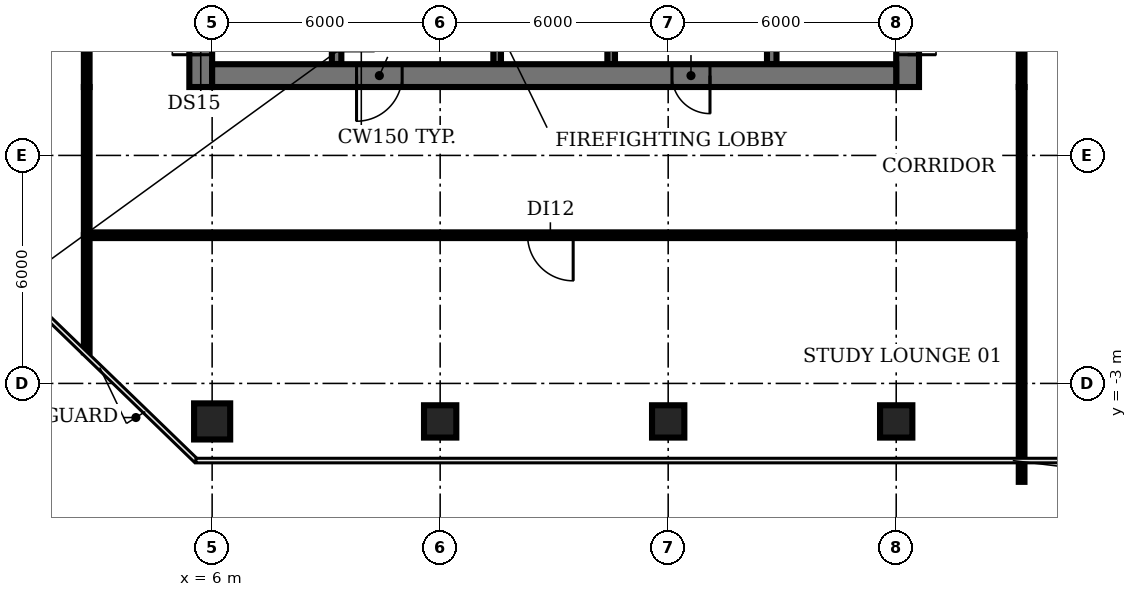
"""IFC4 building model, lengths in metres.
Left out: names, types, materials, properties, quantities, classifications, styles, units other than length and angle.
Written with IfcOpenShell. Run it as: python <this file> out.ifc"""

import sys

from ifc_helpers import new_model, si_unit, direction, frame, frame_2d, origin, origin_2d, place, context, subcontext, project, spatial, rectangle, circle, extrude, element, fill, save


model = new_model("IFC4")
c1 = context("Model", 3, precision=1e-05, world=origin(), true_north=direction((0.0, 1.0)))
c2 = subcontext(c1, "Body", "Model", "MODEL_VIEW")
j1 = project(units=[si_unit("LENGTHUNIT", "METRE"), si_unit("PLANEANGLEUNIT", "RADIAN")], contexts=[c1])
p1 = place(None, origin())
s1 = spatial("IfcSite", under=j1, at=p1, CompositionType="ELEMENT")
p2 = place(p1, origin())
s2 = spatial("IfcBuilding", under=s1, at=p2, CompositionType="ELEMENT")
p3 = place(p2, frame((0.0, 0.0, 155.0)))
s3 = spatial("IfcBuildingStorey", under=s2, at=p3, CompositionType="ELEMENT", Elevation=155.0)
p4 = place(p3, frame((6.0, -4.0, 0.0), z_axis=(0.0, 0.0, 1.0), x_axis=(1.0, 0.0, 0.0)))
e1 = element("IfcColumn", 1, at=p4, inside=s3, PredefinedType="COLUMN", context=c2, shape_type="SweptSolid", body=[
    extrude(circle(Radius=0.475, at=origin_2d()), origin(), (0.0, 0.0, 1.0), 3.85),
])
for number, where, z_axis, x_axis in (
    (2, (12.0, -4.0, 0.0), (0.0, 0.0, 1.0), (1.0, 0.0, 0.0)),
    (3, (18.0, -4.0, 0.0), (0.0, 0.0, 1.0), (1.0, 0.0, 0.0)),
    (4, (24.0, -4.0, 0.0), (0.0, 0.0, 1.0), (1.0, 0.0, 0.0)),
):
    element("IfcColumn", number, at=place(p3, frame(where, z_axis=z_axis, x_axis=x_axis)), inside=s3, PredefinedType="COLUMN", context=c2, shape_type="SweptSolid", body=[
        extrude(rectangle(XDim=0.85, YDim=0.85, at=origin_2d()), origin(), (0.0, 0.0, 1.0), 3.85),
    ])
p5 = place(p3, frame((9.275, 11.825, 0.0), z_axis=(0.0, 0.0, 1.0), x_axis=(0.0, -1.0, 0.0)))
e5 = element("IfcWall", 5, at=p5, inside=s3, PredefinedType="SHEAR", context=c2, shape_type="SweptSolid", body=[
    extrude(rectangle(XDim=6.425, YDim=0.25, at=frame_2d((3.212, 0.0))), origin(), (0.0, 0.0, 1.0), 3.85),
])
p6 = place(p5, frame((5.075, 0.0, 0.0)))
e6 = element("IfcOpeningElement", 6, at=p6, cuts=e5, PredefinedType="OPENING", context=c2, shape_type="SweptSolid", body=[
    extrude(rectangle(XDim=1.0, YDim=2.1, at=frame_2d((0.5, 1.05))), frame((0.0, 0.135, 0.0), z_axis=(0.0, -1.0, 0.0), x_axis=(1.0, 0.0, 0.0)), (0.0, 0.0, 1.0), 0.27),
])
p7 = place(p3, frame((13.5, 5.4, 0.0), z_axis=(0.0, 0.0, 1.0), x_axis=(0.0, 1.0, 0.0)))
e7 = element("IfcWall", 7, at=p7, inside=s3, PredefinedType="SHEAR", context=c2, shape_type="SweptSolid", body=[
    extrude(rectangle(XDim=8.2, YDim=0.2, at=frame_2d((4.1, 0.0))), origin(), (0.0, 0.0, 1.0), 3.85),
])
p8 = place(p7, frame((0.75, 0.0, 0.0)))
e8 = element("IfcOpeningElement", 8, at=p8, cuts=e7, PredefinedType="OPENING", context=c2, shape_type="SweptSolid", body=[
    extrude(rectangle(XDim=1.1, YDim=2.1, at=frame_2d((0.55, 1.05))), frame((0.0, 0.11, 0.0), z_axis=(0.0, -1.0, 0.0), x_axis=(1.0, 0.0, 0.0)), (0.0, 0.0, 1.0), 0.22),
])
p9 = place(p7, frame((3.55, 0.0, 0.0)))
e9 = element("IfcOpeningElement", 9, at=p9, cuts=e7, PredefinedType="OPENING", context=c2, shape_type="SweptSolid", body=[
    extrude(rectangle(XDim=1.1, YDim=2.1, at=frame_2d((0.55, 1.05))), frame((0.0, 0.11, 0.0), z_axis=(0.0, -1.0, 0.0), x_axis=(1.0, 0.0, 0.0)), (0.0, 0.0, 1.0), 0.22),
])
p10 = place(p7, frame((6.35, 0.0, 0.0)))
e10 = element("IfcOpeningElement", 10, at=p10, cuts=e7, PredefinedType="OPENING", context=c2, shape_type="SweptSolid", body=[
    extrude(rectangle(XDim=1.1, YDim=2.1, at=frame_2d((0.55, 1.05))), frame((0.0, 0.11, 0.0), z_axis=(0.0, -1.0, 0.0), x_axis=(1.0, 0.0, 0.0)), (0.0, 0.0, 1.0), 0.22),
])
p11 = place(p3, frame((16.5, 5.4, 0.0), z_axis=(0.0, 0.0, 1.0), x_axis=(0.0, 1.0, 0.0)))
e11 = element("IfcWall", 11, at=p11, inside=s3, PredefinedType="SHEAR", context=c2, shape_type="SweptSolid", body=[
    extrude(rectangle(XDim=8.2, YDim=0.2, at=frame_2d((4.1, 0.0))), origin(), (0.0, 0.0, 1.0), 3.85),
])
p12 = place(p3, frame((20.725, 5.4, 0.0), z_axis=(0.0, 0.0, 1.0), x_axis=(0.0, 1.0, 0.0)))
e12 = element("IfcWall", 12, at=p12, inside=s3, PredefinedType="SHEAR", context=c2, shape_type="SweptSolid", body=[
    extrude(rectangle(XDim=6.3, YDim=0.25, at=frame_2d((3.15, 0.0))), origin(), (0.0, 0.0, 1.0), 3.85),
])
p13 = place(p3, frame((5.7, 4.8, 0.0), z_axis=(0.0, 0.0, 1.0), x_axis=(0.0, 1.0, 0.0)))
e13 = element("IfcWall", 13, at=p13, inside=s3, PredefinedType="SHEAR", context=c2, shape_type="SweptSolid", body=[
    extrude(rectangle(XDim=20.6, YDim=0.6, at=frame_2d((10.3, 0.0))), origin(), (0.0, 0.0, 1.0), 3.85),
])
p14 = place(p13, frame((0.85, 0.0, 0.0)))
e14 = element("IfcOpeningElement", 14, at=p14, cuts=e13, PredefinedType="OPENING", context=c2, shape_type="SweptSolid", body=[
    extrude(rectangle(XDim=1.5, YDim=2.1, at=frame_2d((0.75, 1.05))), frame((0.0, 0.31, 0.0), z_axis=(0.0, -1.0, 0.0), x_axis=(1.0, 0.0, 0.0)), (0.0, 0.0, 1.0), 0.62),
])
p15 = place(p13, frame((7.3, 0.0, 0.0)))
e15 = element("IfcOpeningElement", 15, at=p15, cuts=e13, PredefinedType="OPENING", context=c2, shape_type="SweptSolid", body=[
    extrude(rectangle(XDim=1.2, YDim=2.1, at=frame_2d((0.6, 1.05))), frame((0.0, 0.31, 0.0), z_axis=(0.0, -1.0, 0.0), x_axis=(1.0, 0.0, 0.0)), (0.0, 0.0, 1.0), 0.62),
])
p16 = place(p13, frame((13.85, 0.0, 0.0)))
e16 = element("IfcOpeningElement", 16, at=p16, cuts=e13, PredefinedType="OPENING", context=c2, shape_type="SweptSolid", body=[
    extrude(rectangle(XDim=1.2, YDim=2.1, at=frame_2d((0.6, 1.05))), frame((0.0, 0.31, 0.0), z_axis=(0.0, -1.0, 0.0), x_axis=(1.0, 0.0, 0.0)), (0.0, 0.0, 1.0), 0.62),
])
p17 = place(p3, frame((24.3, 25.555, 0.0), z_axis=(0.0, 0.0, 1.0), x_axis=(0.0, -1.0, 0.0)))
e17 = element("IfcWall", 17, at=p17, inside=s3, PredefinedType="SHEAR", context=c2, shape_type="SweptSolid", body=[
    extrude(rectangle(XDim=20.755, YDim=0.6, at=frame_2d((10.377, 0.0))), origin(), (0.0, 0.0, 1.0), 3.85),
])
p18 = place(p17, frame((18.405, 0.0, 0.0)))
e18 = element("IfcOpeningElement", 18, at=p18, cuts=e17, PredefinedType="OPENING", context=c2, shape_type="SweptSolid", body=[
    extrude(rectangle(XDim=1.5, YDim=2.1, at=frame_2d((0.75, 1.05))), frame((0.0, 0.31, 0.0), z_axis=(0.0, -1.0, 0.0), x_axis=(1.0, 0.0, 0.0)), (0.0, 0.0, 1.0), 0.62),
])
p19 = place(p17, frame((12.305, 0.0, 0.0)))
e19 = element("IfcOpeningElement", 19, at=p19, cuts=e17, PredefinedType="OPENING", context=c2, shape_type="SweptSolid", body=[
    extrude(rectangle(XDim=0.9, YDim=2.1, at=frame_2d((0.45, 1.05))), frame((0.0, 0.31, 0.0), z_axis=(0.0, -1.0, 0.0), x_axis=(1.0, 0.0, 0.0)), (0.0, 0.0, 1.0), 0.62),
])
p20 = place(p17, frame((6.305, 0.0, 0.0)))
e20 = element("IfcOpeningElement", 20, at=p20, cuts=e17, PredefinedType="OPENING", context=c2, shape_type="SweptSolid", body=[
    extrude(rectangle(XDim=2.0, YDim=2.1, at=frame_2d((1.0, 1.05))), frame((0.0, 0.31, 0.0), z_axis=(0.0, -1.0, 0.0), x_axis=(1.0, 0.0, 0.0)), (0.0, 0.0, 1.0), 0.62),
])
p21 = place(p3, frame((24.0, 5.1, 0.0), z_axis=(0.0, 0.0, 1.0), x_axis=(-1.0, 0.0, 0.0)))
e21 = element("IfcWall", 21, at=p21, inside=s3, PredefinedType="SHEAR", context=c2, shape_type="SweptSolid", body=[
    extrude(rectangle(XDim=18.0, YDim=0.6, at=frame_2d((9.0, 0.0))), origin(), (0.0, 0.0, 1.0), 3.85),
])
p22 = place(p21, frame((13.0, 0.0, 0.0)))
e22 = element("IfcOpeningElement", 22, at=p22, cuts=e21, PredefinedType="OPENING", context=c2, shape_type="SweptSolid", body=[
    extrude(rectangle(XDim=1.2, YDim=2.1, at=frame_2d((0.6, 1.05))), frame((0.0, 0.31, 0.0), z_axis=(0.0, -1.0, 0.0), x_axis=(1.0, 0.0, 0.0)), (0.0, 0.0, 1.0), 0.62),
])
p23 = place(p21, frame((4.9, 0.0, 0.0)))
e23 = element("IfcOpeningElement", 23, at=p23, cuts=e21, PredefinedType="OPENING", context=c2, shape_type="SweptSolid", body=[
    extrude(rectangle(XDim=1.0, YDim=2.1, at=frame_2d((0.5, 1.05))), frame((0.0, 0.31, 0.0), z_axis=(0.0, -1.0, 0.0), x_axis=(1.0, 0.0, 0.0)), (0.0, 0.0, 1.0), 0.62),
])
p24 = place(p3, frame((2.7, -2.18, 0.0), z_axis=(0.0, 0.0, 1.0), x_axis=(0.0, 1.0, 0.0)))
e24 = element("IfcWall", 24, at=p24, inside=s3, PredefinedType="PARTITIONING", context=c2, shape_type="SweptSolid", body=[
    extrude(rectangle(XDim=3.08, YDim=0.15, at=frame_2d((1.54, 0.0))), origin(), (0.0, 0.0, 1.0), 2.88),
])
p25 = place(p3, frame((2.7, 0.9, 0.0), z_axis=(0.0, 0.0, 1.0), x_axis=(0.0, 1.0, 0.0)))
e25 = element("IfcWall", 25, at=p25, inside=s3, PredefinedType="PARTITIONING", context=c2, shape_type="SweptSolid", body=[
    extrude(rectangle(XDim=3.9, YDim=0.15, at=frame_2d((1.95, 0.0))), origin(), (0.0, 0.0, 1.0), 2.88),
])
p26 = place(p3, frame((2.7, 4.8, 0.0), z_axis=(0.0, 0.0, 1.0), x_axis=(0.0, 1.0, 0.0)))
e26 = element("IfcWall", 26, at=p26, inside=s3, PredefinedType="PARTITIONING", context=c2, shape_type="SweptSolid", body=[
    extrude(rectangle(XDim=20.6, YDim=0.15, at=frame_2d((10.3, 0.0))), origin(), (0.0, 0.0, 1.0), 2.88),
])
p27 = place(p26, frame((10.2, 0.0, 0.0)))
e27 = element("IfcOpeningElement", 27, at=p27, cuts=e26, PredefinedType="OPENING", context=c2, shape_type="SweptSolid", body=[
    extrude(rectangle(XDim=1.2, YDim=2.1, at=frame_2d((0.6, 1.05))), frame((0.0, 0.085, 0.0), z_axis=(0.0, -1.0, 0.0), x_axis=(1.0, 0.0, 0.0)), (0.0, 0.0, 1.0), 0.17),
])
p28 = place(p3, frame((27.3, -5.59, 0.0), z_axis=(0.0, 0.0, 1.0), x_axis=(0.0, 1.0, 0.0)))
e28 = element("IfcWall", 28, at=p28, inside=s3, PredefinedType="PARTITIONING", context=c2, shape_type="SweptSolid", body=[
    extrude(rectangle(XDim=6.49, YDim=0.15, at=frame_2d((3.245, 0.0))), origin(), (0.0, 0.0, 1.0), 2.88),
])
p29 = place(p3, frame((27.3, 0.9, 0.0), z_axis=(0.0, 0.0, 1.0), x_axis=(-1.0, 0.0, 0.0)))
e29 = element("IfcWall", 29, at=p29, inside=s3, PredefinedType="PARTITIONING", context=c2, shape_type="SweptSolid", body=[
    extrude(rectangle(XDim=24.6, YDim=0.15, at=frame_2d((12.3, 0.0))), origin(), (0.0, 0.0, 1.0), 2.88),
])
p30 = place(p29, frame((11.8, 0.0, 0.0)))
e30 = element("IfcOpeningElement", 30, at=p30, cuts=e29, PredefinedType="OPENING", context=c2, shape_type="SweptSolid", body=[
    extrude(rectangle(XDim=1.2, YDim=2.1, at=frame_2d((0.6, 1.05))), frame((0.0, 0.085, 0.0), z_axis=(0.0, -1.0, 0.0), x_axis=(1.0, 0.0, 0.0)), (0.0, 0.0, 1.0), 0.17),
])
p31 = place(p3, frame((27.3, 0.9, 0.0), z_axis=(0.0, 0.0, 1.0), x_axis=(0.0, 1.0, 0.0)))
e31 = element("IfcWall", 31, at=p31, inside=s3, PredefinedType="PARTITIONING", context=c2, shape_type="SweptSolid", body=[
    extrude(rectangle(XDim=3.9, YDim=0.15, at=frame_2d((1.95, 0.0))), origin(), (0.0, 0.0, 1.0), 2.88),
])
p32 = place(p3, frame((27.3, 4.8, 0.0), z_axis=(0.0, 0.0, 1.0), x_axis=(0.0, 1.0, 0.0)))
e32 = element("IfcWall", 32, at=p32, inside=s3, PredefinedType="PARTITIONING", context=c2, shape_type="SweptSolid", body=[
    extrude(rectangle(XDim=10.0, YDim=0.15, at=frame_2d((5.0, 0.0))), origin(), (0.0, 0.0, 1.0), 2.88),
])
p33 = place(p32, frame((4.4, 0.0, 0.0)))
e33 = element("IfcOpeningElement", 33, at=p33, cuts=e32, PredefinedType="OPENING", context=c2, shape_type="SweptSolid", body=[
    extrude(rectangle(XDim=1.2, YDim=2.1, at=frame_2d((0.6, 1.05))), frame((0.0, 0.085, 0.0), z_axis=(0.0, -1.0, 0.0), x_axis=(1.0, 0.0, 0.0)), (0.0, 0.0, 1.0), 0.17),
])
p34 = place(p14, origin())
e34 = element("IfcDoor", 34, at=p34, inside=s3, OperationType="DOUBLE_DOOR_SINGLE_SWING", PredefinedType="DOOR", context=c2, shape_type="SweptSolid", body=[
    extrude(rectangle(XDim=1.5, YDim=2.1, at=frame_2d((0.75, 1.05))), frame((0.0, 0.025, 0.0), z_axis=(0.0, -1.0, 0.0), x_axis=(1.0, 0.0, 0.0)), (0.0, 0.0, 1.0), 0.05),
])
fill(e14, e34)
p35 = place(p18, origin())
e35 = element("IfcDoor", 35, at=p35, inside=s3, OperationType="DOUBLE_DOOR_SINGLE_SWING", PredefinedType="DOOR", context=c2, shape_type="SweptSolid", body=[
    extrude(rectangle(XDim=1.5, YDim=2.1, at=frame_2d((0.75, 1.05))), frame((0.0, 0.025, 0.0), z_axis=(0.0, -1.0, 0.0), x_axis=(1.0, 0.0, 0.0)), (0.0, 0.0, 1.0), 0.05),
])
fill(e18, e35)
p36 = place(p22, origin())
e36 = element("IfcDoor", 36, at=p36, inside=s3, OperationType="SINGLE_SWING_RIGHT", PredefinedType="DOOR", context=c2, shape_type="SweptSolid", body=[
    extrude(rectangle(XDim=1.2, YDim=2.1, at=frame_2d((0.6, 1.05))), frame((0.0, 0.025, 0.0), z_axis=(0.0, -1.0, 0.0), x_axis=(1.0, 0.0, 0.0)), (0.0, 0.0, 1.0), 0.05),
])
fill(e22, e36)
p37 = place(p23, origin())
e37 = element("IfcDoor", 37, at=p37, inside=s3, OperationType="SINGLE_SWING_LEFT", PredefinedType="DOOR", context=c2, shape_type="SweptSolid", body=[
    extrude(rectangle(XDim=1.0, YDim=2.1, at=frame_2d((0.5, 1.05))), frame((0.0, -0.24, 0.0), z_axis=(0.0, -1.0, 0.0), x_axis=(1.0, 0.0, 0.0)), (0.0, 0.0, 1.0), 0.05),
])
fill(e23, e37)
p38 = place(p30, origin())
e38 = element("IfcDoor", 38, at=p38, inside=s3, OperationType="SINGLE_SWING_LEFT", PredefinedType="DOOR", context=c2, shape_type="SweptSolid", body=[
    extrude(rectangle(XDim=1.2, YDim=2.1, at=frame_2d((0.6, 1.05))), frame((0.0, 0.025, 0.0), z_axis=(0.0, -1.0, 0.0), x_axis=(1.0, 0.0, 0.0)), (0.0, 0.0, 1.0), 0.05),
])
fill(e30, e38)
save(model, sys.argv[1])
